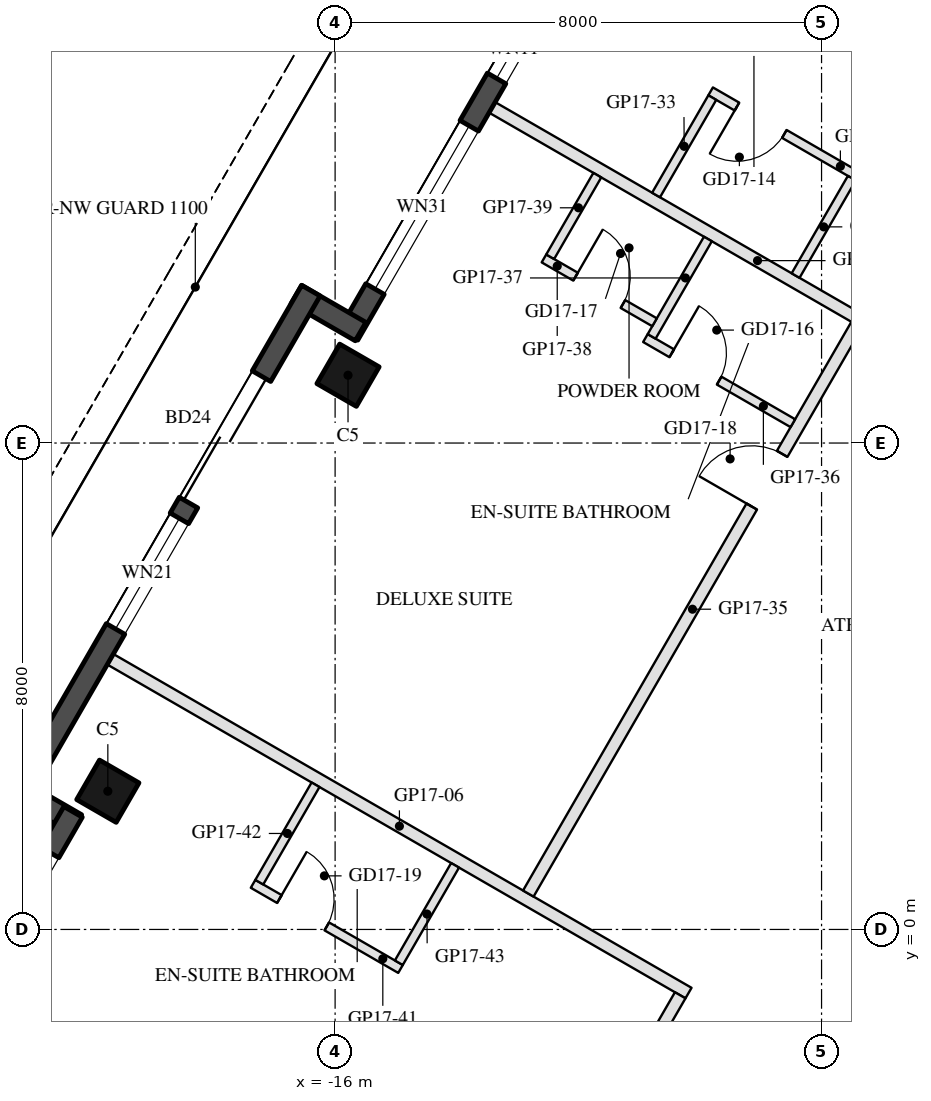
"""IFC4 building model, lengths in metres.
Left out: names, types, materials, properties, quantities, classifications, styles, units other than length and angle.
Written with IfcOpenShell. Run it as: python <this file> out.ifc"""

import sys

from ifc_helpers import new_model, si_unit, direction, frame, frame_2d, origin, origin_2d, place, context, subcontext, project, spatial, rectangle, hollow_rectangle, extrude, element, fill, save


model = new_model("IFC4")
c1 = context("Model", 3, precision=1e-05, world=origin(), true_north=direction((0.0, 1.0)))
c2 = subcontext(c1, "Body", "Model", "MODEL_VIEW")
j1 = project(units=[si_unit("LENGTHUNIT", "METRE"), si_unit("PLANEANGLEUNIT", "RADIAN")], contexts=[c1])
p1 = place(None, origin())
s1 = spatial("IfcSite", under=j1, at=p1, CompositionType="ELEMENT")
p2 = place(p1, origin())
s2 = spatial("IfcBuilding", under=s1, at=p2, CompositionType="ELEMENT")
p3 = place(p2, frame((0.0, 0.0, 187.3)))
s3 = spatial("IfcBuildingStorey", under=s2, at=p3, CompositionType="ELEMENT", Elevation=187.3)
for number, where, z_axis, x_axis in (
    (1, (-15.788, 9.115, 0.0), (0.0, 0.0, 1.0), (0.5, 0.866, 0.0)),
    (2, (-19.738, 2.273, 0.0), (0.0, 0.0, 1.0), (0.5, 0.866, 0.0)),
):
    element("IfcColumn", number, at=place(p3, frame(where, z_axis=z_axis, x_axis=x_axis)), inside=s3, PredefinedType="COLUMN", context=c2, shape_type="SweptSolid", body=[
        extrude(hollow_rectangle(XDim=0.75, YDim=0.75, WallThickness=0.035, at=origin_2d()), origin(), (0.0, 0.0, 1.0), 3.7),
    ])
p4 = place(p3, frame((-12.409, 15.617, 0.0), z_axis=(0.0, 0.0, 1.0), x_axis=(-0.500003597184, -0.866023326939, 0.0)))
e3 = element("IfcWall", 3, at=p4, inside=s3, PredefinedType="SOLIDWALL", context=c2, shape_type="SweptSolid", body=[
    extrude(rectangle(XDim=6.74, YDim=0.35, at=frame_2d((3.37, 0.0))), origin(), (0.0, 0.0, 1.0), 3.55),
])
p5 = place(p4, frame((0.77, 0.0, 0.3)))
e4 = element("IfcOpeningElement", 4, at=p5, cuts=e3, PredefinedType="OPENING", context=c2, shape_type="SweptSolid", body=[
    extrude(rectangle(XDim=1.1, YDim=2.65, at=frame_2d((0.55, 1.325))), frame((0.0, 0.185, 0.0), z_axis=(0.0, -1.0, 0.0), x_axis=(1.0, 0.0, 0.0)), (0.0, 0.0, 1.0), 0.37),
])
p6 = place(p4, frame((2.77, 0.0, 0.3)))
e5 = element("IfcOpeningElement", 5, at=p6, cuts=e3, PredefinedType="OPENING", context=c2, shape_type="SweptSolid", body=[
    extrude(rectangle(XDim=3.1, YDim=2.65, at=frame_2d((1.55, 1.325))), frame((0.0, 0.185, 0.0), z_axis=(0.0, -1.0, 0.0), x_axis=(1.0, 0.0, 0.0)), (0.0, 0.0, 1.0), 0.37),
])
p7 = place(p3, frame((-15.581, 9.833, 0.0), z_axis=(0.0, 0.0, 1.0), x_axis=(-0.866055662726, 0.499947586314, 0.0)))
e6 = element("IfcWall", 6, at=p7, inside=s3, PredefinedType="SOLIDWALL", context=c2, shape_type="SweptSolid", body=[
    extrude(rectangle(XDim=1.22, YDim=0.35, at=frame_2d((0.61, 0.0))), origin(), (0.0, 0.0, 1.0), 3.55),
])
p8 = place(p3, frame((-16.398, 10.507, 0.0), z_axis=(0.0, 0.0, 1.0), x_axis=(-0.499999142773, -0.866025898704, 0.0)))
e7 = element("IfcWall", 7, at=p8, inside=s3, PredefinedType="SOLIDWALL", context=c2, shape_type="SweptSolid", body=[
    extrude(rectangle(XDim=9.7, YDim=0.35, at=frame_2d((4.85, 0.0))), origin(), (0.0, 0.0, 1.0), 3.55),
])
p9 = place(p8, frame((1.625, 0.0, 0.0)))
e8 = element("IfcOpeningElement", 8, at=p9, cuts=e7, PredefinedType="OPENING", context=c2, shape_type="SweptSolid", body=[
    extrude(rectangle(XDim=2.4, YDim=2.4, at=frame_2d((1.2, 1.2))), frame((0.0, 0.185, 0.0), z_axis=(0.0, -1.0, 0.0), x_axis=(1.0, 0.0, 0.0)), (0.0, 0.0, 1.0), 0.37),
])
p10 = place(p8, frame((4.325, 0.0, 0.3)))
e9 = element("IfcOpeningElement", 9, at=p10, cuts=e7, PredefinedType="OPENING", context=c2, shape_type="SweptSolid", body=[
    extrude(rectangle(XDim=2.1, YDim=2.65, at=frame_2d((1.05, 1.325))), frame((0.0, 0.185, 0.0), z_axis=(0.0, -1.0, 0.0), x_axis=(1.0, 0.0, 0.0)), (0.0, 0.0, 1.0), 0.37),
])
p11 = place(p3, frame((-21.312, 2.346, 0.0), z_axis=(0.0, 0.0, 1.0), x_axis=(0.866005645448, -0.500034220881, 0.0)))
e10 = element("IfcWall", 10, at=p11, inside=s3, PredefinedType="SOLIDWALL", context=c2, shape_type="SweptSolid", body=[
    extrude(rectangle(XDim=1.22, YDim=0.35, at=frame_2d((0.61, 0.0))), origin(), (0.0, 0.0, 1.0), 3.55),
])
p12 = place(p3, frame((-20.309, 1.934, 0.0), z_axis=(0.0, 0.0, 1.0), x_axis=(-0.499992114976, -0.866029956157, 0.0)))
e11 = element("IfcWall", 11, at=p12, inside=s3, PredefinedType="SOLIDWALL", context=c2, shape_type="SweptSolid", body=[
    extrude(rectangle(XDim=6.74, YDim=0.35, at=frame_2d((3.37, 0.0))), origin(), (0.0, 0.0, 1.0), 3.55),
])
p13 = place(p12, frame((4.02, 0.0, 0.0)))
e12 = element("IfcOpeningElement", 12, at=p13, cuts=e11, PredefinedType="OPENING", context=c2, shape_type="SweptSolid", body=[
    extrude(rectangle(XDim=2.4, YDim=2.4, at=frame_2d((1.2, 1.2))), frame((0.0, 0.185, 0.0), z_axis=(0.0, -1.0, 0.0), x_axis=(1.0, 0.0, 0.0)), (0.0, 0.0, 1.0), 0.37),
])
p14 = place(p12, frame((0.77, 0.0, 0.3)))
e13 = element("IfcOpeningElement", 13, at=p14, cuts=e11, PredefinedType="OPENING", context=c2, shape_type="SweptSolid", body=[
    extrude(rectangle(XDim=2.9, YDim=2.65, at=frame_2d((1.45, 1.325))), frame((0.0, 0.185, 0.0), z_axis=(0.0, -1.0, 0.0), x_axis=(1.0, 0.0, 0.0)), (0.0, 0.0, 1.0), 0.37),
])
p15 = place(p3, frame((-13.417, 13.52, 0.0), z_axis=(0.0, 0.0, 1.0), x_axis=(0.866022637375, -0.500004791531, 0.0)))
e14 = element("IfcWall", 14, at=p15, inside=s3, PredefinedType="PARTITIONING", context=c2, shape_type="SweptSolid", body=[
    extrude(rectangle(XDim=10.08, YDim=0.2, at=frame_2d((5.04, 0.0))), origin(), (0.0, 0.0, 1.0), 3.06),
])
p16 = place(p3, frame((-19.697, 4.444, 0.0), z_axis=(0.0, 0.0, 1.0), x_axis=(0.866027479907, -0.499996404033, 0.0)))
e15 = element("IfcWall", 15, at=p16, inside=s3, PredefinedType="PARTITIONING", context=c2, shape_type="SweptSolid", body=[
    extrude(rectangle(XDim=10.98, YDim=0.2, at=frame_2d((5.49, 0.0))), origin(), (0.0, 0.0, 1.0), 3.06),
])
p17 = place(p3, frame((-7.399, 12.384, 0.0), z_axis=(0.0, 0.0, 1.0), x_axis=(-0.866034573852, 0.49998411664, 0.0)))
e16 = element("IfcWall", 16, at=p17, inside=s3, PredefinedType="PARTITIONING", context=c2, shape_type="SweptSolid", body=[
    extrude(rectangle(XDim=2.8, YDim=0.15, at=frame_2d((1.4, 0.0))), origin(), (0.0, 0.0, 1.0), 3.55),
])
p18 = place(p17, frame((1.4, 0.0, 0.0)))
e17 = element("IfcOpeningElement", 17, at=p18, cuts=e16, PredefinedType="OPENING", context=c2, shape_type="SweptSolid", body=[
    extrude(rectangle(XDim=0.9, YDim=2.1, at=frame_2d((0.45, 1.05))), frame((0.0, 0.085, 0.0), z_axis=(0.0, -1.0, 0.0), x_axis=(1.0, 0.0, 0.0)), (0.0, 0.0, 1.0), 0.17),
])
for number, where, z_axis, x_axis in (
    (18, (-9.797, 13.681, 0.0), (0.0, 0.0, 1.0), (-0.5, -0.866, 0.0)),
    (19, (-7.502, 12.356, 0.0), (0.0, 0.0, 1.0), (-0.5, -0.866, 0.0)),
):
    element("IfcWall", number, at=place(p3, frame(where, z_axis=z_axis, x_axis=x_axis)), inside=s3, PredefinedType="PARTITIONING", context=c2, shape_type="SweptSolid", body=[
        extrude(rectangle(XDim=1.85, YDim=0.15, at=frame_2d((0.925, 0.0))), origin(), (0.0, 0.0, 1.0), 3.55),
    ])
p19 = place(p3, frame((-12.823, 0.591, 0.0), z_axis=(0.0, 0.0, 1.0), x_axis=(0.500012057535, 0.866018442252, 0.0)))
e20 = element("IfcWall", 20, at=p19, inside=s3, PredefinedType="PARTITIONING", context=c2, shape_type="SweptSolid", body=[
    extrude(rectangle(XDim=10.8, YDim=0.2, at=frame_2d((5.4, 0.0))), origin(), (0.0, 0.0, 1.0), 2.95),
])
p20 = place(p19, frame((7.35, 0.0, 0.0)))
e21 = element("IfcOpeningElement", 21, at=p20, cuts=e20, PredefinedType="OPENING", context=c2, shape_type="SweptSolid", body=[
    extrude(rectangle(XDim=1.0, YDim=2.1, at=frame_2d((0.5, 1.05))), frame((0.0, 0.11, 0.0), z_axis=(0.0, -1.0, 0.0), x_axis=(1.0, 0.0, 0.0)), (0.0, 0.0, 1.0), 0.22),
])
p21 = place(p3, frame((-10.897, 9.726, 0.0), z_axis=(0.0, 0.0, 1.0), x_axis=(0.866056369097, -0.49994636267, 0.0)))
e22 = element("IfcWall", 22, at=p21, inside=s3, PredefinedType="PARTITIONING", context=c2, shape_type="SweptSolid", body=[
    extrude(rectangle(XDim=2.8, YDim=0.15, at=frame_2d((1.4, 0.0))), origin(), (0.0, 0.0, 1.0), 3.55),
])
p22 = place(p21, frame((0.5, 0.0, 0.0)))
e23 = element("IfcOpeningElement", 23, at=p22, cuts=e22, PredefinedType="OPENING", context=c2, shape_type="SweptSolid", body=[
    extrude(rectangle(XDim=0.9, YDim=2.1, at=frame_2d((0.45, 1.05))), frame((0.0, 0.085, 0.0), z_axis=(0.0, -1.0, 0.0), x_axis=(1.0, 0.0, 0.0)), (0.0, 0.0, 1.0), 0.17),
])
p23 = place(p3, frame((-9.869, 11.356, 0.0), z_axis=(0.0, 0.0, 1.0), x_axis=(-0.500042316284, -0.866000971088, 0.0)))
e24 = element("IfcWall", 24, at=p23, inside=s3, PredefinedType="PARTITIONING", context=c2, shape_type="SweptSolid", body=[
    extrude(rectangle(XDim=1.85, YDim=0.15, at=frame_2d((0.925, 0.0))), origin(), (0.0, 0.0, 1.0), 2.95),
])
p24 = place(p3, frame((-12.565, 11.036, 0.0), z_axis=(0.0, 0.0, 1.0), x_axis=(0.866009402589, -0.500027713859, 0.0)))
e25 = element("IfcWall", 25, at=p24, inside=s3, PredefinedType="PARTITIONING", context=c2, shape_type="SweptSolid", body=[
    extrude(rectangle(XDim=2.1, YDim=0.15, at=frame_2d((1.05, 0.0))), origin(), (0.0, 0.0, 1.0), 3.55),
])
p25 = place(p24, frame((0.6, 0.0, 0.0)))
e26 = element("IfcOpeningElement", 26, at=p25, cuts=e25, PredefinedType="OPENING", context=c2, shape_type="SweptSolid", body=[
    extrude(rectangle(XDim=0.9, YDim=2.1, at=frame_2d((0.45, 1.05))), frame((0.0, 0.085, 0.0), z_axis=(0.0, -1.0, 0.0), x_axis=(1.0, 0.0, 0.0)), (0.0, 0.0, 1.0), 0.17),
])
p26 = place(p3, frame((-11.688, 12.406, 0.0), z_axis=(0.0, 0.0, 1.0), x_axis=(-0.499967891604, -0.866043940782, 0.0)))
e27 = element("IfcWall", 27, at=p26, inside=s3, PredefinedType="PARTITIONING", context=c2, shape_type="SweptSolid", body=[
    extrude(rectangle(XDim=1.55, YDim=0.15, at=frame_2d((0.775, 0.0))), origin(), (0.0, 0.0, 1.0), 2.95),
])
p27 = place(p3, frame((-12.269, -4.45, 0.0), z_axis=(0.0, 0.0, 1.0), x_axis=(0.500008716408, 0.866020371305, 0.0)))
e28 = element("IfcWall", 28, at=p27, inside=s3, PredefinedType="PARTITIONING", context=c2, shape_type="SweptSolid", body=[
    extrude(rectangle(XDim=3.888, YDim=0.2, at=frame_2d((1.944, 0.0))), origin(), (0.0, 0.0, 1.0), 2.95),
])
p28 = place(p27, frame((1.444, 0.0, 0.0)))
e29 = element("IfcOpeningElement", 29, at=p28, cuts=e28, PredefinedType="OPENING", context=c2, shape_type="SweptSolid", body=[
    extrude(rectangle(XDim=1.0, YDim=2.1, at=frame_2d((0.5, 1.05))), frame((0.0, 0.11, 0.0), z_axis=(0.0, -1.0, 0.0), x_axis=(1.0, 0.0, 0.0)), (0.0, 0.0, 1.0), 0.22),
])
p29 = place(p3, frame((-17.349, 0.75, 0.0), z_axis=(0.0, 0.0, 1.0), x_axis=(0.866056369097, -0.49994636267, 0.0)))
e30 = element("IfcWall", 30, at=p29, inside=s3, PredefinedType="PARTITIONING", context=c2, shape_type="SweptSolid", body=[
    extrude(rectangle(XDim=2.8, YDim=0.15, at=frame_2d((1.4, 0.0))), origin(), (0.0, 0.0, 1.0), 2.95),
])
p30 = place(p29, frame((0.5, 0.0, 0.0)))
e31 = element("IfcOpeningElement", 31, at=p30, cuts=e30, PredefinedType="OPENING", context=c2, shape_type="SweptSolid", body=[
    extrude(rectangle(XDim=0.9, YDim=2.1, at=frame_2d((0.45, 1.05))), frame((0.0, 0.085, 0.0), z_axis=(0.0, -1.0, 0.0), x_axis=(1.0, 0.0, 0.0)), (0.0, 0.0, 1.0), 0.17),
])
for number, where, z_axis, x_axis in (
    (32, (-16.322, 2.38, 0.0), (0.0, 0.0, 1.0), (-0.5, -0.866, 0.0)),
    (33, (-14.027, 1.055, 0.0), (0.0, 0.0, 1.0), (-0.5, -0.866, 0.0)),
):
    element("IfcWall", number, at=place(p3, frame(where, z_axis=z_axis, x_axis=x_axis)), inside=s3, PredefinedType="PARTITIONING", context=c2, shape_type="SweptSolid", body=[
        extrude(rectangle(XDim=1.85, YDim=0.15, at=frame_2d((0.925, 0.0))), origin(), (0.0, 0.0, 1.0), 2.95),
    ])
p31 = place(p5, origin())
e34 = element("IfcWindow", 34, at=p31, inside=s3, PartitioningType="SINGLE_PANEL", PredefinedType="WINDOW", context=c2, shape_type="SweptSolid", body=[
    extrude(rectangle(XDim=1.1, YDim=2.65, at=frame_2d((0.55, 1.325))), frame((0.0, 0.03, 0.0), z_axis=(0.0, -1.0, 0.0), x_axis=(1.0, 0.0, 0.0)), (0.0, 0.0, 1.0), 0.06),
])
fill(e4, e34)
p32 = place(p6, origin())
e35 = element("IfcWindow", 35, at=p32, inside=s3, PartitioningType="SINGLE_PANEL", PredefinedType="WINDOW", context=c2, shape_type="SweptSolid", body=[
    extrude(rectangle(XDim=3.1, YDim=2.65, at=frame_2d((1.55, 1.325))), frame((0.0, 0.03, 0.0), z_axis=(0.0, -1.0, 0.0), x_axis=(1.0, 0.0, 0.0)), (0.0, 0.0, 1.0), 0.06),
])
fill(e5, e35)
p33 = place(p9, frame((2.4, 0.0, 0.0), z_axis=(0.0, 0.0, 1.0), x_axis=(-1.0, 0.0, 0.0)))
e36 = element("IfcDoor", 36, at=p33, inside=s3, OperationType="SLIDING_TO_LEFT", PredefinedType="DOOR", context=c2, shape_type="SweptSolid", body=[
    extrude(rectangle(XDim=2.4, YDim=2.4, at=frame_2d((1.2, 1.2))), frame((0.0, 0.025, 0.0), z_axis=(0.0, -1.0, 0.0), x_axis=(1.0, 0.0, 0.0)), (0.0, 0.0, 1.0), 0.05),
])
fill(e8, e36)
p34 = place(p10, origin())
e37 = element("IfcWindow", 37, at=p34, inside=s3, PartitioningType="SINGLE_PANEL", PredefinedType="WINDOW", context=c2, shape_type="SweptSolid", body=[
    extrude(rectangle(XDim=2.1, YDim=2.65, at=frame_2d((1.05, 1.325))), frame((0.0, 0.03, 0.0), z_axis=(0.0, -1.0, 0.0), x_axis=(1.0, 0.0, 0.0)), (0.0, 0.0, 1.0), 0.06),
])
fill(e9, e37)
p35 = place(p18, origin())
e38 = element("IfcDoor", 38, at=p35, inside=s3, OperationType="SINGLE_SWING_RIGHT", PredefinedType="DOOR", context=c2, shape_type="SweptSolid", body=[
    extrude(rectangle(XDim=0.9, YDim=2.1, at=frame_2d((0.45, 1.05))), frame((0.0, 0.025, 0.0), z_axis=(0.0, -1.0, 0.0), x_axis=(1.0, 0.0, 0.0)), (0.0, 0.0, 1.0), 0.05),
])
fill(e17, e38)
p36 = place(p22, origin())
e39 = element("IfcDoor", 39, at=p36, inside=s3, OperationType="SINGLE_SWING_LEFT", PredefinedType="DOOR", context=c2, shape_type="SweptSolid", body=[
    extrude(rectangle(XDim=0.9, YDim=2.1, at=frame_2d((0.45, 1.05))), frame((0.0, 0.025, 0.0), z_axis=(0.0, -1.0, 0.0), x_axis=(1.0, 0.0, 0.0)), (0.0, 0.0, 1.0), 0.05),
])
fill(e23, e39)
p37 = place(p25, origin())
e40 = element("IfcDoor", 40, at=p37, inside=s3, OperationType="SINGLE_SWING_LEFT", PredefinedType="DOOR", context=c2, shape_type="SweptSolid", body=[
    extrude(rectangle(XDim=0.9, YDim=2.1, at=frame_2d((0.45, 1.05))), frame((0.0, 0.025, 0.0), z_axis=(0.0, -1.0, 0.0), x_axis=(1.0, 0.0, 0.0)), (0.0, 0.0, 1.0), 0.05),
])
fill(e26, e40)
p38 = place(p20, origin())
e41 = element("IfcDoor", 41, at=p38, inside=s3, OperationType="SINGLE_SWING_LEFT", PredefinedType="DOOR", context=c2, shape_type="SweptSolid", body=[
    extrude(rectangle(XDim=1.0, YDim=2.1, at=frame_2d((0.5, 1.05))), frame((0.0, 0.025, 0.0), z_axis=(0.0, -1.0, 0.0), x_axis=(1.0, 0.0, 0.0)), (0.0, 0.0, 1.0), 0.05),
])
fill(e21, e41)
p39 = place(p30, origin())
e42 = element("IfcDoor", 42, at=p39, inside=s3, OperationType="SINGLE_SWING_LEFT", PredefinedType="DOOR", context=c2, shape_type="SweptSolid", body=[
    extrude(rectangle(XDim=0.9, YDim=2.1, at=frame_2d((0.45, 1.05))), frame((0.0, 0.025, 0.0), z_axis=(0.0, -1.0, 0.0), x_axis=(1.0, 0.0, 0.0)), (0.0, 0.0, 1.0), 0.05),
])
fill(e31, e42)
save(model, sys.argv[1])
